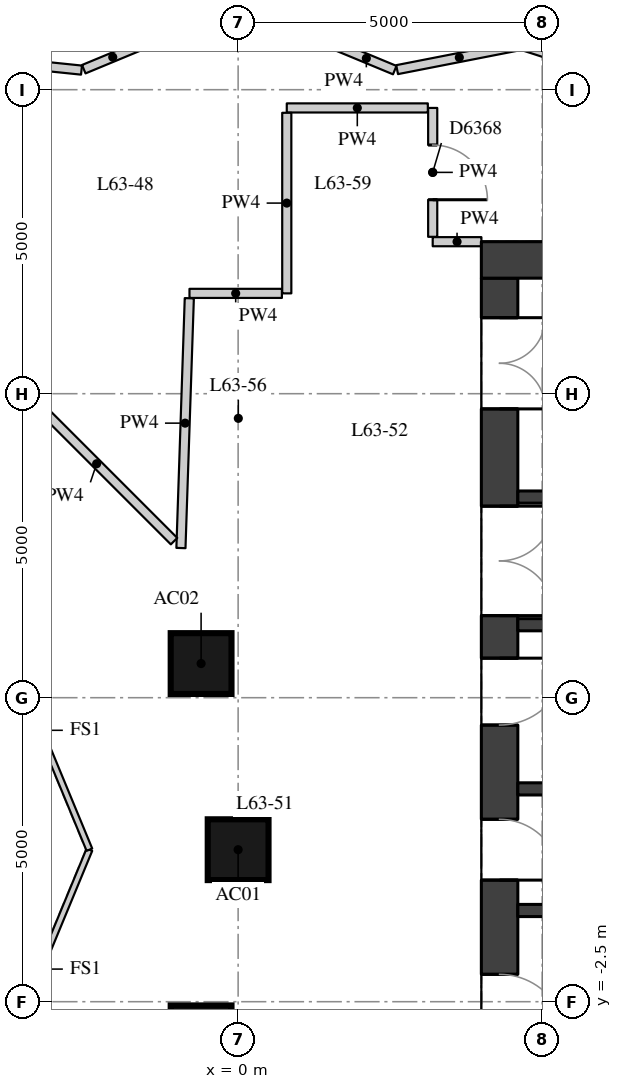
"""IFC4 building model, lengths in metres.
Left out: names, types, materials, properties, quantities, classifications, styles, units other than length and angle.
Written with IfcOpenShell. Run it as: python <this file> out.ifc"""

import sys

from ifc_helpers import new_model, si_unit, direction, frame, frame_2d, origin, origin_2d, place, context, subcontext, project, spatial, rectangle, extrude, element, fill, save


model = new_model("IFC4")
c1 = context("Model", 3, precision=1e-05, world=origin(), true_north=direction((0.0, 1.0)))
c2 = subcontext(c1, "Body", "Model", "MODEL_VIEW")
j1 = project(units=[si_unit("LENGTHUNIT", "METRE"), si_unit("PLANEANGLEUNIT", "RADIAN")], contexts=[c1])
p1 = place(None, origin())
s1 = spatial("IfcSite", under=j1, at=p1, CompositionType="ELEMENT")
p2 = place(p1, origin())
s2 = spatial("IfcBuilding", under=s1, at=p2, CompositionType="ELEMENT")
p3 = place(p2, frame((0.0, 0.0, 222.2)))
s3 = spatial("IfcBuildingStorey", under=s2, at=p3, CompositionType="ELEMENT", Elevation=222.2)
for number, where, z_axis, x_axis in (
    (1, (0.0, 0.0, 0.0), (0.0, 0.0, 1.0), (1.0, 0.0, 0.0)),
    (2, (-0.609, 3.062, 0.0), (0.0, 0.0, 1.0), (1.0, 0.0, 0.0)),
    (3, (-0.609, -3.062, 0.0), (0.0, 0.0, 1.0), (1.0, 0.0, 0.0)),
):
    element("IfcColumn", number, at=place(p3, frame(where, z_axis=z_axis, x_axis=x_axis)), inside=s3, PredefinedType="COLUMN", context=c2, shape_type="SweptSolid", body=[
        extrude(rectangle(XDim=1.0, YDim=1.0, at=origin_2d()), origin(), (0.0, 0.0, 1.0), 3.3),
    ])
p4 = place(p3, frame((4.3, -9.4, 0.0), z_axis=(0.0, 0.0, 1.0), x_axis=(0.0, 1.0, 0.0)))
e4 = element("IfcWall", 4, at=p4, inside=s3, PredefinedType="SHEAR", context=c2, shape_type="SweptSolid", body=[
    extrude(rectangle(XDim=18.8, YDim=0.6, at=frame_2d((9.4, 0.0))), origin(), (0.0, 0.0, 1.0), 3.02),
])
p5 = place(p4, frame((0.65, 0.0, 0.0)))
e5 = element("IfcOpeningElement", 5, at=p5, cuts=e4, PredefinedType="OPENING", context=c2, shape_type="SweptSolid", body=[
    extrude(rectangle(XDim=1.5, YDim=2.1, at=frame_2d((0.75, 1.05))), frame((0.0, 0.31, 0.0), z_axis=(0.0, -1.0, 0.0), x_axis=(1.0, 0.0, 0.0)), (0.0, 0.0, 1.0), 0.62),
])
p6 = place(p4, frame((3.75, 0.0, 0.0)))
e6 = element("IfcOpeningElement", 6, at=p6, cuts=e4, PredefinedType="OPENING", context=c2, shape_type="SweptSolid", body=[
    extrude(rectangle(XDim=1.8, YDim=2.1, at=frame_2d((0.9, 1.05))), frame((0.0, 0.31, 0.0), z_axis=(0.0, -1.0, 0.0), x_axis=(1.0, 0.0, 0.0)), (0.0, 0.0, 1.0), 0.62),
])
p7 = place(p4, frame((6.25, 0.0, 0.0)))
e7 = element("IfcOpeningElement", 7, at=p7, cuts=e4, PredefinedType="OPENING", context=c2, shape_type="SweptSolid", body=[
    extrude(rectangle(XDim=1.1, YDim=2.1, at=frame_2d((0.55, 1.05))), frame((0.0, 0.31, 0.0), z_axis=(0.0, -1.0, 0.0), x_axis=(1.0, 0.0, 0.0)), (0.0, 0.0, 1.0), 0.62),
])
p8 = place(p4, frame((8.9, 0.0, 0.0)))
e8 = element("IfcOpeningElement", 8, at=p8, cuts=e4, PredefinedType="OPENING", context=c2, shape_type="SweptSolid", body=[
    extrude(rectangle(XDim=1.0, YDim=2.1, at=frame_2d((0.5, 1.05))), frame((0.0, 0.31, 0.0), z_axis=(0.0, -1.0, 0.0), x_axis=(1.0, 0.0, 0.0)), (0.0, 0.0, 1.0), 0.62),
])
p9 = place(p4, frame((11.45, 0.0, 0.0)))
e9 = element("IfcOpeningElement", 9, at=p9, cuts=e4, PredefinedType="OPENING", context=c2, shape_type="SweptSolid", body=[
    extrude(rectangle(XDim=1.1, YDim=2.1, at=frame_2d((0.55, 1.05))), frame((0.0, 0.31, 0.0), z_axis=(0.0, -1.0, 0.0), x_axis=(1.0, 0.0, 0.0)), (0.0, 0.0, 1.0), 0.62),
])
p10 = place(p4, frame((13.25, 0.0, 0.0)))
e10 = element("IfcOpeningElement", 10, at=p10, cuts=e4, PredefinedType="OPENING", context=c2, shape_type="SweptSolid", body=[
    extrude(rectangle(XDim=1.8, YDim=2.1, at=frame_2d((0.9, 1.05))), frame((0.0, 0.31, 0.0), z_axis=(0.0, -1.0, 0.0), x_axis=(1.0, 0.0, 0.0)), (0.0, 0.0, 1.0), 0.62),
])
p11 = place(p4, frame((16.65, 0.0, 0.0)))
e11 = element("IfcOpeningElement", 11, at=p11, cuts=e4, PredefinedType="OPENING", context=c2, shape_type="SweptSolid", body=[
    extrude(rectangle(XDim=1.5, YDim=2.1, at=frame_2d((0.75, 1.05))), frame((0.0, 0.31, 0.0), z_axis=(0.0, -1.0, 0.0), x_axis=(1.0, 0.0, 0.0)), (0.0, 0.0, 1.0), 0.62),
])
p12 = place(p3, frame((4.0, 9.7, 0.0), z_axis=(0.0, 0.0, 1.0), x_axis=(1.0, 0.0, 0.0)))
e12 = element("IfcWall", 12, at=p12, inside=s3, PredefinedType="SHEAR", context=c2, shape_type="SweptSolid", body=[
    extrude(rectangle(XDim=12.0, YDim=0.6, at=frame_2d((6.0, 0.0))), origin(), (0.0, 0.0, 1.0), 3.02),
])
p13 = place(p3, frame((4.6, 5.8, 0.0), z_axis=(0.0, 0.0, 1.0), x_axis=(1.0, 0.0, 0.0)))
e13 = element("IfcWall", 13, at=p13, inside=s3, PredefinedType="SHEAR", context=c2, shape_type="SweptSolid", body=[
    extrude(rectangle(XDim=10.8, YDim=0.2, at=frame_2d((5.4, 0.0))), origin(), (0.0, 0.0, 1.0), 3.02),
])
p14 = place(p13, frame((7.05, 0.0, 0.0)))
e14 = element("IfcOpeningElement", 14, at=p14, cuts=e13, PredefinedType="OPENING", context=c2, shape_type="SweptSolid", body=[
    extrude(rectangle(XDim=1.1, YDim=2.1, at=frame_2d((0.55, 1.05))), frame((0.0, 0.11, 0.0), z_axis=(0.0, -1.0, 0.0), x_axis=(1.0, 0.0, 0.0)), (0.0, 0.0, 1.0), 0.22),
])
p15 = place(p13, frame((9.05, 0.0, 0.0)))
e15 = element("IfcOpeningElement", 15, at=p15, cuts=e13, PredefinedType="OPENING", context=c2, shape_type="SweptSolid", body=[
    extrude(rectangle(XDim=1.1, YDim=2.1, at=frame_2d((0.55, 1.05))), frame((0.0, 0.11, 0.0), z_axis=(0.0, -1.0, 0.0), x_axis=(1.0, 0.0, 0.0)), (0.0, 0.0, 1.0), 0.22),
])
p16 = place(p3, frame((4.6, 3.7, 0.0), z_axis=(0.0, 0.0, 1.0), x_axis=(1.0, 0.0, 0.0)))
e16 = element("IfcWall", 16, at=p16, inside=s3, PredefinedType="SHEAR", context=c2, shape_type="SweptSolid", body=[
    extrude(rectangle(XDim=10.8, YDim=0.2, at=frame_2d((5.4, 0.0))), origin(), (0.0, 0.0, 1.0), 3.02),
])
p17 = place(p16, frame((6.6, 0.0, 0.0)))
e17 = element("IfcOpeningElement", 17, at=p17, cuts=e16, PredefinedType="OPENING", context=c2, shape_type="SweptSolid", body=[
    extrude(rectangle(XDim=1.1, YDim=2.1, at=frame_2d((0.55, 1.05))), frame((0.0, 0.11, 0.0), z_axis=(0.0, -1.0, 0.0), x_axis=(1.0, 0.0, 0.0)), (0.0, 0.0, 1.0), 0.22),
])
p18 = place(p16, frame((8.9, 0.0, 0.0)))
e18 = element("IfcOpeningElement", 18, at=p18, cuts=e16, PredefinedType="OPENING", context=c2, shape_type="SweptSolid", body=[
    extrude(rectangle(XDim=1.1, YDim=2.1, at=frame_2d((0.55, 1.05))), frame((0.0, 0.11, 0.0), z_axis=(0.0, -1.0, 0.0), x_axis=(1.0, 0.0, 0.0)), (0.0, 0.0, 1.0), 0.22),
])
for number, where, z_axis, x_axis in (
    (19, (4.6, 1.0, 0.0), (0.0, 0.0, 1.0), (1.0, 0.0, 0.0)),
    (20, (4.6, -1.0, 0.0), (0.0, 0.0, 1.0), (1.0, 0.0, 0.0)),
):
    element("IfcWall", number, at=place(p3, frame(where, z_axis=z_axis, x_axis=x_axis)), inside=s3, PredefinedType="SHEAR", context=c2, shape_type="SweptSolid", body=[
        extrude(rectangle(XDim=10.8, YDim=0.2, at=frame_2d((5.4, 0.0))), origin(), (0.0, 0.0, 1.0), 3.02),
    ])
p19 = place(p3, frame((0.795, 16.169, 0.0), z_axis=(0.0, 0.0, 1.0), x_axis=(0.950998491074, -0.309195520626, 0.0)))
e21 = element("IfcWall", 21, at=p19, inside=s3, PredefinedType="PARTITIONING", context=c2, shape_type="SweptSolid", body=[
    extrude(rectangle(XDim=12.357, YDim=0.2, at=frame_2d((6.179, 0.0))), origin(), (0.0, 0.0, 1.0), 3.02),
])
p20 = place(p19, frame((8.496, 0.0, 0.0)))
e22 = element("IfcOpeningElement", 22, at=p20, cuts=e21, PredefinedType="OPENING", context=c2, shape_type="SweptSolid", body=[
    extrude(rectangle(XDim=1.1, YDim=2.1, at=frame_2d((0.55, 1.05))), frame((0.0, 0.11, 0.0), z_axis=(0.0, -1.0, 0.0), x_axis=(1.0, 0.0, 0.0)), (0.0, 0.0, 1.0), 0.22),
])
p21 = place(p19, frame((4.169, 0.0, 0.0)))
e23 = element("IfcOpeningElement", 23, at=p21, cuts=e21, PredefinedType="OPENING", context=c2, shape_type="SweptSolid", body=[
    extrude(rectangle(XDim=0.9, YDim=2.1, at=frame_2d((0.45, 1.05))), frame((0.0, 0.11, 0.0), z_axis=(0.0, -1.0, 0.0), x_axis=(1.0, 0.0, 0.0)), (0.0, 0.0, 1.0), 0.22),
])
p22 = place(p19, frame((0.747, 0.0, 0.0)))
e24 = element("IfcOpeningElement", 24, at=p22, cuts=e21, PredefinedType="OPENING", context=c2, shape_type="SweptSolid", body=[
    extrude(rectangle(XDim=0.9, YDim=2.1, at=frame_2d((0.45, 1.05))), frame((0.0, 0.11, 0.0), z_axis=(0.0, -1.0, 0.0), x_axis=(1.0, 0.0, 0.0)), (0.0, 0.0, 1.0), 0.22),
])
p23 = place(p3, frame((4.001, 10.0, 0.0), z_axis=(0.0, 0.0, 1.0), x_axis=(-1.0, 0.0, 0.0)))
e25 = element("IfcWall", 25, at=p23, inside=s3, PredefinedType="PARTITIONING", context=c2, shape_type="SweptSolid", body=[
    extrude(rectangle(XDim=0.801, YDim=0.15, at=frame_2d((0.4, 0.0))), origin(), (0.0, 0.0, 1.0), 3.02),
])
p24 = place(p3, frame((3.2, 10.08, 0.0), z_axis=(0.0, 0.0, 1.0), x_axis=(0.0, 1.0, 0.0)))
e26 = element("IfcWall", 26, at=p24, inside=s3, PredefinedType="PARTITIONING", context=c2, shape_type="SweptSolid", body=[
    extrude(rectangle(XDim=2.12, YDim=0.15, at=frame_2d((1.06, 0.0))), origin(), (0.0, 0.0, 1.0), 3.02),
])
p25 = place(p24, frame((0.61, 0.0, 0.0)))
e27 = element("IfcOpeningElement", 27, at=p25, cuts=e26, PredefinedType="OPENING", context=c2, shape_type="SweptSolid", body=[
    extrude(rectangle(XDim=0.9, YDim=2.1, at=frame_2d((0.45, 1.05))), frame((0.0, 0.085, 0.0), z_axis=(0.0, -1.0, 0.0), x_axis=(1.0, 0.0, 0.0)), (0.0, 0.0, 1.0), 0.17),
])
p26 = place(p3, frame((3.12, 12.2, 0.0), z_axis=(0.0, 0.0, 1.0), x_axis=(-1.0, 0.0, 0.0)))
e28 = element("IfcWall", 28, at=p26, inside=s3, PredefinedType="PARTITIONING", context=c2, shape_type="SweptSolid", body=[
    extrude(rectangle(XDim=2.32, YDim=0.15, at=frame_2d((1.16, 0.0))), origin(), (0.0, 0.0, 1.0), 3.02),
])
p27 = place(p3, frame((0.8, 12.12, 0.0), z_axis=(0.0, 0.0, 1.0), x_axis=(0.0, -1.0, 0.0)))
e29 = element("IfcWall", 29, at=p27, inside=s3, PredefinedType="PARTITIONING", context=c2, shape_type="SweptSolid", body=[
    extrude(rectangle(XDim=2.97, YDim=0.15, at=frame_2d((1.485, 0.0))), origin(), (0.0, 0.0, 1.0), 3.02),
])
p28 = place(p3, frame((0.72, 9.15, 0.0), z_axis=(0.0, 0.0, 1.0), x_axis=(-1.0, 0.0, 0.0)))
e30 = element("IfcWall", 30, at=p28, inside=s3, PredefinedType="PARTITIONING", context=c2, shape_type="SweptSolid", body=[
    extrude(rectangle(XDim=1.52, YDim=0.15, at=frame_2d((0.76, 0.0))), origin(), (0.0, 0.0, 1.0), 3.02),
])
p29 = place(p3, frame((-0.803, 9.07, 0.0), z_axis=(0.0, 0.0, 1.0), x_axis=(-0.033496761224, -0.999438826036, 0.0)))
e31 = element("IfcWall", 31, at=p29, inside=s3, PredefinedType="PARTITIONING", context=c2, shape_type="SweptSolid", body=[
    extrude(rectangle(XDim=4.111, YDim=0.15, at=frame_2d((2.055, 0.0))), origin(), (0.0, 0.0, 1.0), 3.02),
])
p30 = place(p3, frame((-1.054, 5.075, 0.0), z_axis=(0.0, 0.0, 1.0), x_axis=(-0.707106781187, 0.707106781187, 0.0)))
e32 = element("IfcWall", 32, at=p30, inside=s3, PredefinedType="PARTITIONING", context=c2, shape_type="SweptSolid", body=[
    extrude(rectangle(XDim=3.601, YDim=0.15, at=frame_2d((1.8, 0.0))), origin(), (0.0, 0.0, 1.0), 3.02),
])
p31 = place(p3, frame((-5.229, 13.095, 0.0), z_axis=(0.0, 0.0, 1.0), x_axis=(0.994729851422, -0.102530593925, 0.0)))
e33 = element("IfcWall", 33, at=p31, inside=s3, PredefinedType="PARTITIONING", context=c2, shape_type="SweptSolid", body=[
    extrude(rectangle(XDim=2.667, YDim=0.15, at=frame_2d((1.333, 0.0))), origin(), (0.0, 0.0, 1.0), 3.02),
])
p32 = place(p3, frame((-2.539, 12.837, 0.0), z_axis=(0.0, 0.0, 1.0), x_axis=(0.923768662954, 0.382950985565, 0.0)))
e34 = element("IfcWall", 34, at=p32, inside=s3, PredefinedType="PARTITIONING", context=c2, shape_type="SweptSolid", body=[
    extrude(rectangle(XDim=1.031, YDim=0.15, at=frame_2d((0.516, 0.0))), origin(), (0.0, 0.0, 1.0), 3.02),
])
p33 = place(p3, frame((1.641, 13.209, 0.0), z_axis=(0.0, 0.0, 1.0), x_axis=(0.923725449546, -0.383055209937, 0.0)))
e35 = element("IfcWall", 35, at=p33, inside=s3, PredefinedType="PARTITIONING", context=c2, shape_type="SweptSolid", body=[
    extrude(rectangle(XDim=1.011, YDim=0.15, at=frame_2d((0.506, 0.0))), origin(), (0.0, 0.0, 1.0), 3.02),
])
p34 = place(p3, frame((2.615, 12.83, 0.0), z_axis=(0.0, 0.0, 1.0), x_axis=(0.98140512634, 0.191947852276, 0.0)))
e36 = element("IfcWall", 36, at=p34, inside=s3, PredefinedType="PARTITIONING", context=c2, shape_type="SweptSolid", body=[
    extrude(rectangle(XDim=2.085, YDim=0.15, at=frame_2d((1.042, 0.0))), origin(), (0.0, 0.0, 1.0), 3.02),
])
p35 = place(p3, frame((4.699, 13.218, 0.0), z_axis=(0.0, 0.0, 1.0), x_axis=(0.95099963578, -0.30919199981, 0.0)))
e37 = element("IfcWall", 37, at=p35, inside=s3, PredefinedType="PARTITIONING", context=c2, shape_type="SweptSolid", body=[
    extrude(rectangle(XDim=7.244, YDim=0.15, at=frame_2d((3.622, 0.0))), origin(), (0.0, 0.0, 1.0), 3.02),
])
for number, where, z_axis, x_axis in (
    (38, (-2.446, 0.0, 0.0), (0.0, 0.0, 1.0), (-0.383, -0.924, 0.0)),
    (39, (-4.073, 3.927, 0.0), (0.0, 0.0, 1.0), (0.383, -0.924, 0.0)),
):
    element("IfcWall", number, at=place(p3, frame(where, z_axis=z_axis, x_axis=x_axis)), inside=s3, PredefinedType="PARTITIONING", context=c2, shape_type="SweptSolid", body=[
        extrude(rectangle(XDim=4.251, YDim=0.1, at=frame_2d((2.125, 0.0))), origin(), (0.0, 0.0, 1.0), 3.02),
    ])
p36 = place(p7, origin())
e40 = element("IfcDoor", 40, at=p36, inside=s3, OperationType="SINGLE_SWING_RIGHT", PredefinedType="DOOR", context=c2, shape_type="SweptSolid", body=[
    extrude(rectangle(XDim=1.1, YDim=2.1, at=frame_2d((0.55, 1.05))), frame((0.0, 0.025, 0.0), z_axis=(0.0, -1.0, 0.0), x_axis=(1.0, 0.0, 0.0)), (0.0, 0.0, 1.0), 0.05),
])
fill(e7, e40)
p37 = place(p8, origin())
e41 = element("IfcDoor", 41, at=p37, inside=s3, OperationType="SINGLE_SWING_RIGHT", PredefinedType="DOOR", context=c2, shape_type="SweptSolid", body=[
    extrude(rectangle(XDim=1.0, YDim=2.1, at=frame_2d((0.5, 1.05))), frame((0.0, 0.025, 0.0), z_axis=(0.0, -1.0, 0.0), x_axis=(1.0, 0.0, 0.0)), (0.0, 0.0, 1.0), 0.05),
])
fill(e8, e41)
p38 = place(p9, origin())
e42 = element("IfcDoor", 42, at=p38, inside=s3, OperationType="SINGLE_SWING_LEFT", PredefinedType="DOOR", context=c2, shape_type="SweptSolid", body=[
    extrude(rectangle(XDim=1.1, YDim=2.1, at=frame_2d((0.55, 1.05))), frame((0.0, 0.025, 0.0), z_axis=(0.0, -1.0, 0.0), x_axis=(1.0, 0.0, 0.0)), (0.0, 0.0, 1.0), 0.05),
])
fill(e9, e42)
p39 = place(p10, origin())
e43 = element("IfcDoor", 43, at=p39, inside=s3, OperationType="DOUBLE_DOOR_SINGLE_SWING", PredefinedType="DOOR", context=c2, shape_type="SweptSolid", body=[
    extrude(rectangle(XDim=1.8, YDim=2.1, at=frame_2d((0.9, 1.05))), frame((0.0, 0.025, 0.0), z_axis=(0.0, -1.0, 0.0), x_axis=(1.0, 0.0, 0.0)), (0.0, 0.0, 1.0), 0.05),
])
fill(e10, e43)
p40 = place(p11, origin())
e44 = element("IfcDoor", 44, at=p40, inside=s3, OperationType="DOUBLE_DOOR_SINGLE_SWING", PredefinedType="DOOR", context=c2, shape_type="SweptSolid", body=[
    extrude(rectangle(XDim=1.5, YDim=2.1, at=frame_2d((0.75, 1.05))), frame((0.0, 0.025, 0.0), z_axis=(0.0, -1.0, 0.0), x_axis=(1.0, 0.0, 0.0)), (0.0, 0.0, 1.0), 0.05),
])
fill(e11, e44)
p41 = place(p25, origin())
e45 = element("IfcDoor", 45, at=p41, inside=s3, OperationType="SINGLE_SWING_RIGHT", PredefinedType="DOOR", context=c2, shape_type="SweptSolid", body=[
    extrude(rectangle(XDim=0.9, YDim=2.1, at=frame_2d((0.45, 1.05))), frame((0.0, 0.025, 0.0), z_axis=(0.0, -1.0, 0.0), x_axis=(1.0, 0.0, 0.0)), (0.0, 0.0, 1.0), 0.05),
])
fill(e27, e45)
save(model, sys.argv[1])
